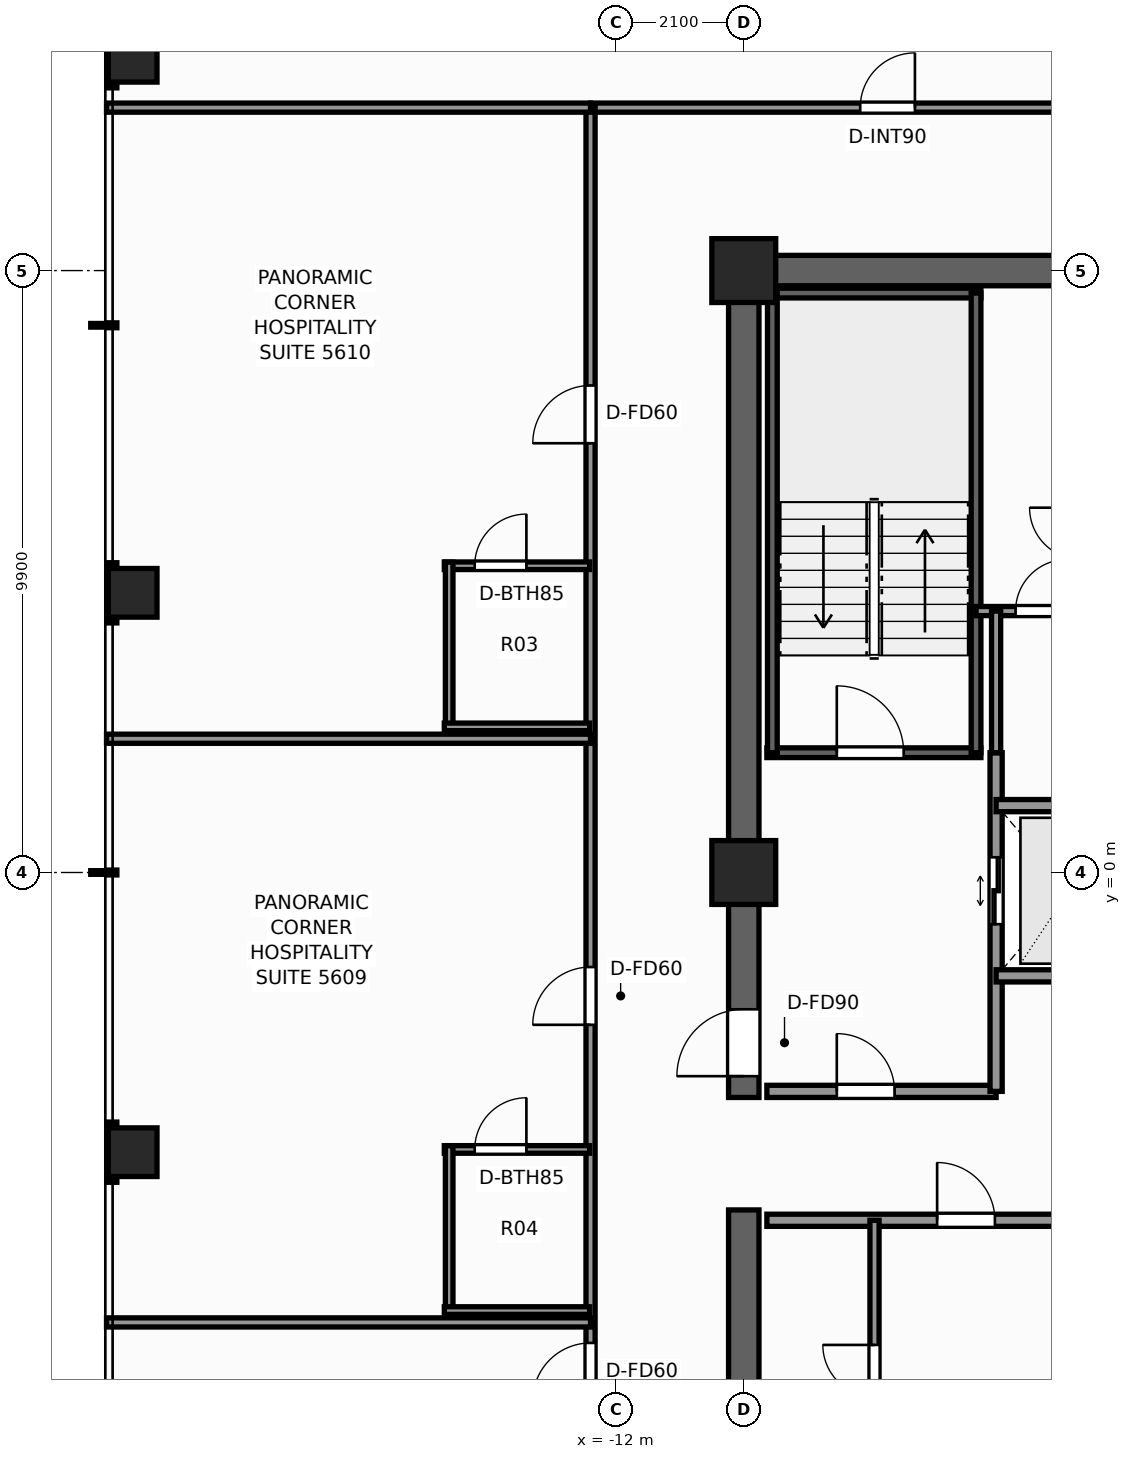
"""IFC4 building model, lengths in metres.
Left out: names, types, materials, properties, quantities, classifications, styles, units other than length and angle.
Written with IfcOpenShell. Run it as: python <this file> out.ifc"""

import sys

from ifc_helpers import new_model, si_unit, direction, frame, frame_2d, origin, origin_2d, place, context, subcontext, project, spatial, rectangle, extrude, element, fill, save


model = new_model("IFC4")
c1 = context("Model", 3, precision=1e-05, world=origin(), true_north=direction((0.0, 1.0)))
c2 = subcontext(c1, "Body", "Model", "MODEL_VIEW")
j1 = project(units=[si_unit("LENGTHUNIT", "METRE"), si_unit("PLANEANGLEUNIT", "RADIAN")], contexts=[c1])
p1 = place(None, origin())
s1 = spatial("IfcSite", under=j1, at=p1, CompositionType="ELEMENT")
p2 = place(p1, origin())
s2 = spatial("IfcBuilding", under=s1, at=p2, CompositionType="ELEMENT")
p3 = place(p2, frame((0.0, 0.0, 193.2)))
s3 = spatial("IfcBuildingStorey", under=s2, at=p3, CompositionType="ELEMENT", Elevation=193.2)
p4 = place(p3, frame((-10.15, 9.9, 0.0), z_axis=(0.0, 0.0, 1.0), x_axis=(1.0, 0.0, 0.0)))
e1 = element("IfcWall", 1, at=p4, inside=s3, PredefinedType="SHEAR", context=c2, shape_type="SweptSolid", body=[
    extrude(rectangle(XDim=14.57, YDim=0.5, at=frame_2d((7.285, 0.0))), origin(), (0.0, 0.0, 1.0), 3.3),
])
p5 = place(p3, frame((-9.9, -9.65, 0.0), z_axis=(0.0, 0.0, 1.0), x_axis=(0.0, 1.0, 0.0)))
e2 = element("IfcWall", 2, at=p5, inside=s3, PredefinedType="SHEAR", context=c2, shape_type="SweptSolid", body=[
    extrude(rectangle(XDim=4.1, YDim=0.5, at=frame_2d((2.05, 0.0))), origin(), (0.0, 0.0, 1.0), 3.3),
])
p6 = place(p3, frame((-9.9, -3.7, 0.0), z_axis=(0.0, 0.0, 1.0), x_axis=(0.0, 1.0, 0.0)))
e3 = element("IfcWall", 3, at=p6, inside=s3, PredefinedType="SHEAR", context=c2, shape_type="SweptSolid", body=[
    extrude(rectangle(XDim=13.35, YDim=0.5, at=frame_2d((6.675, 0.0))), origin(), (0.0, 0.0, 1.0), 3.3),
])
p7 = place(p6, frame((0.35, 0.0, 0.0)))
e4 = element("IfcOpeningElement", 4, at=p7, cuts=e3, PredefinedType="OPENING", context=c2, shape_type="SweptSolid", body=[
    extrude(rectangle(XDim=1.1, YDim=2.2, at=frame_2d((0.55, 1.1))), frame((0.0, 0.26, 0.0), z_axis=(0.0, -1.0, 0.0), x_axis=(1.0, 0.0, 0.0)), (0.0, 0.0, 1.0), 0.52),
])
for number, where, z_axis, x_axis in (
    (5, (-9.9, 9.9, 0.0), (0.0, 0.0, 1.0), (1.0, 0.0, 0.0)),
    (6, (-9.9, 0.0, 0.0), (0.0, 0.0, 1.0), (1.0, 0.0, 0.0)),
):
    element("IfcColumn", number, at=place(p3, frame(where, z_axis=z_axis, x_axis=x_axis)), inside=s3, PredefinedType="COLUMN", context=c2, shape_type="SweptSolid", body=[
        extrude(rectangle(XDim=1.05, YDim=1.05, at=origin_2d()), origin(), (0.0, 0.0, 1.0), 3.3),
    ])
for number, where, z_axis, x_axis in (
    (7, (-19.95, -4.6, 0.0), (0.0, 0.0, 1.0), (1.0, 0.0, 0.0)),
    (8, (-19.95, 4.6, 0.0), (0.0, 0.0, 1.0), (1.0, 0.0, 0.0)),
    (9, (-19.95, 13.4, 0.0), (0.0, 0.0, 1.0), (1.0, 0.0, 0.0)),
):
    element("IfcColumn", number, at=place(p3, frame(where, z_axis=z_axis, x_axis=x_axis)), inside=s3, PredefinedType="COLUMN", context=c2, shape_type="SweptSolid", body=[
        extrude(rectangle(XDim=0.8, YDim=0.8, at=origin_2d()), origin(), (0.0, 0.0, 1.0), 3.3),
    ])
p8 = place(p3, frame((-9.52, 1.97, 0.0), z_axis=(0.0, 0.0, 1.0), x_axis=(1.0, 0.0, 0.0)))
e10 = element("IfcWall", 10, at=p8, inside=s3, PredefinedType="SHEAR", context=c2, shape_type="SweptSolid", body=[
    extrude(rectangle(XDim=3.52, YDim=0.16, at=frame_2d((1.76, 0.0))), origin(), (0.0, 0.0, 1.0), 3.3),
])
p9 = place(p8, frame((1.15, 0.0, 0.0)))
e11 = element("IfcOpeningElement", 11, at=p9, cuts=e10, PredefinedType="OPENING", context=c2, shape_type="SweptSolid", body=[
    extrude(rectangle(XDim=1.1, YDim=2.2, at=frame_2d((0.55, 1.1))), frame((0.0, 0.09, 0.0), z_axis=(0.0, -1.0, 0.0), x_axis=(1.0, 0.0, 0.0)), (0.0, 0.0, 1.0), 0.18),
])
p10 = place(p3, frame((-9.52, 9.53, 0.0), z_axis=(0.0, 0.0, 1.0), x_axis=(1.0, 0.0, 0.0)))
e12 = element("IfcWall", 12, at=p10, inside=s3, PredefinedType="SHEAR", context=c2, shape_type="SweptSolid", body=[
    extrude(rectangle(XDim=3.52, YDim=0.16, at=frame_2d((1.76, 0.0))), origin(), (0.0, 0.0, 1.0), 3.3),
])
for number, where, z_axis, x_axis in (
    (13, (-9.43, 1.97, 0.0), (0.0, 0.0, 1.0), (0.0, 1.0, 0.0)),
    (14, (-6.08, 1.97, 0.0), (0.0, 0.0, 1.0), (0.0, 1.0, 0.0)),
):
    element("IfcWall", number, at=place(p3, frame(where, z_axis=z_axis, x_axis=x_axis)), inside=s3, PredefinedType="SHEAR", context=c2, shape_type="SweptSolid", body=[
        extrude(rectangle(XDim=7.56, YDim=0.16, at=frame_2d((3.78, 0.0))), origin(), (0.0, 0.0, 1.0), 3.3),
    ])
p11 = place(p3, frame((-9.52, -3.6, 0.0), z_axis=(0.0, 0.0, 1.0), x_axis=(1.0, 0.0, 0.0)))
e15 = element("IfcWall", 15, at=p11, inside=s3, PredefinedType="SOLIDWALL", context=c2, shape_type="SweptSolid", body=[
    extrude(rectangle(XDim=3.77, YDim=0.2, at=frame_2d((1.885, 0.0))), origin(), (0.0, 0.0, 1.0), 3.08),
])
p12 = place(p11, frame((1.15, 0.0, 0.0)))
e16 = element("IfcOpeningElement", 16, at=p12, cuts=e15, PredefinedType="OPENING", context=c2, shape_type="SweptSolid", body=[
    extrude(rectangle(XDim=0.95, YDim=2.06, at=frame_2d((0.475, 1.03))), frame((0.0, 0.11, 0.0), z_axis=(0.0, -1.0, 0.0), x_axis=(1.0, 0.0, 0.0)), (0.0, 0.0, 1.0), 0.22),
])
p13 = place(p3, frame((-5.75, -3.6, 0.0), z_axis=(0.0, 0.0, 1.0), x_axis=(0.0, 1.0, 0.0)))
e17 = element("IfcWall", 17, at=p13, inside=s3, PredefinedType="SOLIDWALL", context=c2, shape_type="SweptSolid", body=[
    extrude(rectangle(XDim=5.57, YDim=0.2, at=frame_2d((2.785, 0.0))), origin(), (0.0, 0.0, 1.0), 3.08),
])
p14 = place(p13, frame((2.75, 0.0, 0.0)))
e18 = element("IfcOpeningElement", 18, at=p14, cuts=e17, PredefinedType="OPENING", context=c2, shape_type="SweptSolid", body=[
    extrude(rectangle(XDim=1.1, YDim=2.2, at=frame_2d((0.55, 1.1))), frame((0.0, 0.11, 0.0), z_axis=(0.0, -1.0, 0.0), x_axis=(1.0, 0.0, 0.0)), (0.0, 0.0, 1.0), 0.22),
])
for number, where, z_axis, x_axis in (
    (19, (-5.75, -1.7, 0.0), (0.0, 0.0, 1.0), (1.0, 0.0, 0.0)),
    (20, (-5.75, 1.1, 0.0), (0.0, 0.0, 1.0), (1.0, 0.0, 0.0)),
):
    element("IfcWall", number, at=place(p3, frame(where, z_axis=z_axis, x_axis=x_axis)), inside=s3, PredefinedType="SOLIDWALL", context=c2, shape_type="SweptSolid", body=[
        extrude(rectangle(XDim=2.4, YDim=0.2, at=frame_2d((1.2, 0.0))), origin(), (0.0, 0.0, 1.0), 3.08),
    ])
p15 = place(p3, frame((-6.08, 4.3, 0.0), z_axis=(0.0, 0.0, 1.0), x_axis=(1.0, 0.0, 0.0)))
e21 = element("IfcWall", 21, at=p15, inside=s3, PredefinedType="PARTITIONING", context=c2, shape_type="SweptSolid", body=[
    extrude(rectangle(XDim=6.3, YDim=0.15, at=frame_2d((3.15, 0.0))), origin(), (0.0, 0.0, 1.0), 3.08),
])
p16 = place(p15, frame((0.65, 0.0, 0.0)))
e22 = element("IfcOpeningElement", 22, at=p16, cuts=e21, PredefinedType="OPENING", context=c2, shape_type="SweptSolid", body=[
    extrude(rectangle(XDim=0.85, YDim=2.03, at=frame_2d((0.425, 1.015))), frame((0.0, 0.085, 0.0), z_axis=(0.0, -1.0, 0.0), x_axis=(1.0, 0.0, 0.0)), (0.0, 0.0, 1.0), 0.17),
])
p17 = place(p3, frame((-9.52, -5.72, 0.0), z_axis=(0.0, 0.0, 1.0), x_axis=(1.0, 0.0, 0.0)))
e23 = element("IfcWall", 23, at=p17, inside=s3, PredefinedType="SOLIDWALL", context=c2, shape_type="SweptSolid", body=[
    extrude(rectangle(XDim=5.66, YDim=0.2, at=frame_2d((2.83, 0.0))), origin(), (0.0, 0.0, 1.0), 3.08),
])
p18 = place(p17, frame((2.8, 0.0, 0.0)))
e24 = element("IfcOpeningElement", 24, at=p18, cuts=e23, PredefinedType="OPENING", context=c2, shape_type="SweptSolid", body=[
    extrude(rectangle(XDim=0.95, YDim=2.06, at=frame_2d((0.475, 1.03))), frame((0.0, 0.11, 0.0), z_axis=(0.0, -1.0, 0.0), x_axis=(1.0, 0.0, 0.0)), (0.0, 0.0, 1.0), 0.22),
])
p19 = place(p3, frame((-7.75, -9.52, 0.0), z_axis=(0.0, 0.0, 1.0), x_axis=(0.0, 1.0, 0.0)))
e25 = element("IfcWall", 25, at=p19, inside=s3, PredefinedType="PARTITIONING", context=c2, shape_type="SweptSolid", body=[
    extrude(rectangle(XDim=3.8, YDim=0.15, at=frame_2d((1.9, 0.0))), origin(), (0.0, 0.0, 1.0), 3.08),
])
p20 = place(p19, frame((0.9, 0.0, 0.0)))
e26 = element("IfcOpeningElement", 26, at=p20, cuts=e25, PredefinedType="OPENING", context=c2, shape_type="SweptSolid", body=[
    extrude(rectangle(XDim=0.85, YDim=2.03, at=frame_2d((0.425, 1.015))), frame((0.0, 0.085, 0.0), z_axis=(0.0, -1.0, 0.0), x_axis=(1.0, 0.0, 0.0)), (0.0, 0.0, 1.0), 0.17),
])
p21 = place(p3, frame((-5.75, 1.97, 0.0), z_axis=(0.0, 0.0, 1.0), x_axis=(0.0, 1.0, 0.0)))
e27 = element("IfcWall", 27, at=p21, inside=s3, PredefinedType="PARTITIONING", context=c2, shape_type="SweptSolid", body=[
    extrude(rectangle(XDim=2.33, YDim=0.15, at=frame_2d((1.165, 0.0))), origin(), (0.0, 0.0, 1.0), 3.08),
])
p22 = place(p3, frame((-12.42, 12.58, 0.0), z_axis=(0.0, 0.0, 1.0), x_axis=(1.0, 0.0, 0.0)))
e28 = element("IfcWall", 28, at=p22, inside=s3, PredefinedType="PARTITIONING", context=c2, shape_type="SweptSolid", body=[
    extrude(rectangle(XDim=24.84, YDim=0.15, at=frame_2d((12.42, 0.0))), origin(), (0.0, 0.0, 1.0), 2.369),
])
p23 = place(p22, frame((4.435, 0.0, 0.0)))
e29 = element("IfcOpeningElement", 29, at=p23, cuts=e28, PredefinedType="OPENING", context=c2, shape_type="SweptSolid", body=[
    extrude(rectangle(XDim=0.9, YDim=2.06, at=frame_2d((0.45, 1.03))), frame((0.0, 0.085, 0.0), z_axis=(0.0, -1.0, 0.0), x_axis=(1.0, 0.0, 0.0)), (0.0, 0.0, 1.0), 0.17),
])
p24 = place(p22, frame((19.505, 0.0, 0.0)))
e30 = element("IfcOpeningElement", 30, at=p24, cuts=e28, PredefinedType="OPENING", context=c2, shape_type="SweptSolid", body=[
    extrude(rectangle(XDim=0.9, YDim=2.06, at=frame_2d((0.45, 1.03))), frame((0.0, 0.085, 0.0), z_axis=(0.0, -1.0, 0.0), x_axis=(1.0, 0.0, 0.0)), (0.0, 0.0, 1.0), 0.17),
])
p25 = place(p3, frame((-12.42, -12.26, 0.0), z_axis=(0.0, 0.0, 1.0), x_axis=(0.0, 1.0, 0.0)))
e31 = element("IfcWall", 31, at=p25, inside=s3, PredefinedType="PARTITIONING", context=c2, shape_type="SweptSolid", body=[
    extrude(rectangle(XDim=24.84, YDim=0.15, at=frame_2d((12.42, 0.0))), origin(), (0.0, 0.0, 1.0), 2.369),
])
p26 = place(p25, frame((3.573, 0.0, 0.0)))
e32 = element("IfcOpeningElement", 32, at=p26, cuts=e31, PredefinedType="OPENING", context=c2, shape_type="SweptSolid", body=[
    extrude(rectangle(XDim=0.95, YDim=2.06, at=frame_2d((0.475, 1.03))), frame((0.0, 0.085, 0.0), z_axis=(0.0, -1.0, 0.0), x_axis=(1.0, 0.0, 0.0)), (0.0, 0.0, 1.0), 0.17),
])
p27 = place(p25, frame((9.755, 0.0, 0.0)))
e33 = element("IfcOpeningElement", 33, at=p27, cuts=e31, PredefinedType="OPENING", context=c2, shape_type="SweptSolid", body=[
    extrude(rectangle(XDim=0.95, YDim=2.06, at=frame_2d((0.475, 1.03))), frame((0.0, 0.085, 0.0), z_axis=(0.0, -1.0, 0.0), x_axis=(1.0, 0.0, 0.0)), (0.0, 0.0, 1.0), 0.17),
])
p28 = place(p25, frame((19.32, 0.0, 0.0)))
e34 = element("IfcOpeningElement", 34, at=p28, cuts=e31, PredefinedType="OPENING", context=c2, shape_type="SweptSolid", body=[
    extrude(rectangle(XDim=0.95, YDim=2.06, at=frame_2d((0.475, 1.03))), frame((0.0, 0.085, 0.0), z_axis=(0.0, -1.0, 0.0), x_axis=(1.0, 0.0, 0.0)), (0.0, 0.0, 1.0), 0.17),
])
p29 = place(p3, frame((-20.38, 12.58, 0.0), z_axis=(0.0, 0.0, 1.0), x_axis=(1.0, 0.0, 0.0)))
e35 = element("IfcWall", 35, at=p29, inside=s3, PredefinedType="PARTITIONING", context=c2, shape_type="SweptSolid", body=[
    extrude(rectangle(XDim=7.96, YDim=0.15, at=frame_2d((3.98, 0.0))), origin(), (0.0, 0.0, 1.0), 2.369),
])
for number, where, z_axis, x_axis in (
    (36, (-20.38, -7.4, 0.0), (0.0, 0.0, 1.0), (1.0, 0.0, 0.0)),
    (37, (-20.38, 2.2, 0.0), (0.0, 0.0, 1.0), (1.0, 0.0, 0.0)),
):
    element("IfcWall", number, at=place(p3, frame(where, z_axis=z_axis, x_axis=x_axis)), inside=s3, PredefinedType="PARTITIONING", context=c2, shape_type="SweptSolid", body=[
        extrude(rectangle(XDim=7.96, YDim=0.15, at=frame_2d((3.98, 0.0))), origin(), (0.0, 0.0, 1.0), 2.453),
    ])
p30 = place(p3, frame((-14.825, -4.555, 0.0), z_axis=(0.0, 0.0, 1.0), x_axis=(1.0, 0.0, 0.0)))
e38 = element("IfcWall", 38, at=p30, inside=s3, PredefinedType="PARTITIONING", context=c2, shape_type="SweptSolid", body=[
    extrude(rectangle(XDim=2.39, YDim=0.125, at=frame_2d((1.195, 0.0))), origin(), (0.0, 0.0, 1.0), 2.369),
])
p31 = place(p30, frame((0.5, 0.0, 0.0)))
e39 = element("IfcOpeningElement", 39, at=p31, cuts=e38, PredefinedType="OPENING", context=c2, shape_type="SweptSolid", body=[
    extrude(rectangle(XDim=0.85, YDim=2.03, at=frame_2d((0.425, 1.015))), frame((0.0, 0.073, 0.0), z_axis=(0.0, -1.0, 0.0), x_axis=(1.0, 0.0, 0.0)), (0.0, 0.0, 1.0), 0.145),
])
p32 = place(p3, frame((-14.745, -7.265, 0.0), z_axis=(0.0, 0.0, 1.0), x_axis=(0.0, 1.0, 0.0)))
e40 = element("IfcWall", 40, at=p32, inside=s3, PredefinedType="PARTITIONING", context=c2, shape_type="SweptSolid", body=[
    extrude(rectangle(XDim=2.77, YDim=0.125, at=frame_2d((1.385, 0.0))), origin(), (0.0, 0.0, 1.0), 2.369),
])
p33 = place(p3, frame((-14.825, -7.205, 0.0), z_axis=(0.0, 0.0, 1.0), x_axis=(1.0, 0.0, 0.0)))
e41 = element("IfcWall", 41, at=p33, inside=s3, PredefinedType="PARTITIONING", context=c2, shape_type="SweptSolid", body=[
    extrude(rectangle(XDim=2.39, YDim=0.125, at=frame_2d((1.195, 0.0))), origin(), (0.0, 0.0, 1.0), 3.08),
])
p34 = place(p3, frame((-14.825, 5.045, 0.0), z_axis=(0.0, 0.0, 1.0), x_axis=(1.0, 0.0, 0.0)))
e42 = element("IfcWall", 42, at=p34, inside=s3, PredefinedType="PARTITIONING", context=c2, shape_type="SweptSolid", body=[
    extrude(rectangle(XDim=2.39, YDim=0.125, at=frame_2d((1.195, 0.0))), origin(), (0.0, 0.0, 1.0), 3.08),
])
p35 = place(p34, frame((0.5, 0.0, 0.0)))
e43 = element("IfcOpeningElement", 43, at=p35, cuts=e42, PredefinedType="OPENING", context=c2, shape_type="SweptSolid", body=[
    extrude(rectangle(XDim=0.85, YDim=2.03, at=frame_2d((0.425, 1.015))), frame((0.0, 0.073, 0.0), z_axis=(0.0, -1.0, 0.0), x_axis=(1.0, 0.0, 0.0)), (0.0, 0.0, 1.0), 0.145),
])
p36 = place(p3, frame((-14.745, 2.335, 0.0), z_axis=(0.0, 0.0, 1.0), x_axis=(0.0, 1.0, 0.0)))
e44 = element("IfcWall", 44, at=p36, inside=s3, PredefinedType="PARTITIONING", context=c2, shape_type="SweptSolid", body=[
    extrude(rectangle(XDim=2.77, YDim=0.125, at=frame_2d((1.385, 0.0))), origin(), (0.0, 0.0, 1.0), 2.369),
])
p37 = place(p3, frame((-14.825, 2.395, 0.0), z_axis=(0.0, 0.0, 1.0), x_axis=(1.0, 0.0, 0.0)))
e45 = element("IfcWall", 45, at=p37, inside=s3, PredefinedType="PARTITIONING", context=c2, shape_type="SweptSolid", body=[
    extrude(rectangle(XDim=2.39, YDim=0.125, at=frame_2d((1.195, 0.0))), origin(), (0.0, 0.0, 1.0), 3.08),
])
p38 = place(p9, origin())
e46 = element("IfcDoor", 46, at=p38, inside=s3, OperationType="SINGLE_SWING_LEFT", PredefinedType="DOOR", context=c2, shape_type="SweptSolid", body=[
    extrude(rectangle(XDim=1.1, YDim=2.2, at=frame_2d((0.55, 1.1))), frame((0.0, 0.025, 0.0), z_axis=(0.0, -1.0, 0.0), x_axis=(1.0, 0.0, 0.0)), (0.0, 0.0, 1.0), 0.05),
])
fill(e11, e46)
p39 = place(p7, origin())
e47 = element("IfcDoor", 47, at=p39, inside=s3, OperationType="SINGLE_SWING_LEFT", PredefinedType="DOOR", context=c2, shape_type="SweptSolid", body=[
    extrude(rectangle(XDim=1.1, YDim=2.2, at=frame_2d((0.55, 1.1))), frame((0.0, 0.025, 0.0), z_axis=(0.0, -1.0, 0.0), x_axis=(1.0, 0.0, 0.0)), (0.0, 0.0, 1.0), 0.05),
])
fill(e4, e47)
p40 = place(p14, origin())
e48 = element("IfcDoor", 48, at=p40, inside=s3, OperationType="DOUBLE_DOOR_SLIDING", PredefinedType="DOOR", context=c2, shape_type="SweptSolid", body=[
    extrude(rectangle(XDim=1.1, YDim=2.2, at=frame_2d((0.55, 1.1))), frame((0.0, 0.025, 0.0), z_axis=(0.0, -1.0, 0.0), x_axis=(1.0, 0.0, 0.0)), (0.0, 0.0, 1.0), 0.05),
])
fill(e18, e48)
p41 = place(p18, origin())
e49 = element("IfcDoor", 49, at=p41, inside=s3, OperationType="SINGLE_SWING_LEFT", PredefinedType="DOOR", context=c2, shape_type="SweptSolid", body=[
    extrude(rectangle(XDim=0.95, YDim=2.06, at=frame_2d((0.475, 1.03))), frame((0.0, 0.025, 0.0), z_axis=(0.0, -1.0, 0.0), x_axis=(1.0, 0.0, 0.0)), (0.0, 0.0, 1.0), 0.05),
])
fill(e24, e49)
p42 = place(p20, origin())
e50 = element("IfcDoor", 50, at=p42, inside=s3, OperationType="SINGLE_SWING_RIGHT", PredefinedType="DOOR", context=c2, shape_type="SweptSolid", body=[
    extrude(rectangle(XDim=0.85, YDim=2.03, at=frame_2d((0.425, 1.015))), frame((0.0, 0.025, 0.0), z_axis=(0.0, -1.0, 0.0), x_axis=(1.0, 0.0, 0.0)), (0.0, 0.0, 1.0), 0.05),
])
fill(e26, e50)
p43 = place(p12, origin())
e51 = element("IfcDoor", 51, at=p43, inside=s3, OperationType="SINGLE_SWING_LEFT", PredefinedType="DOOR", context=c2, shape_type="SweptSolid", body=[
    extrude(rectangle(XDim=0.95, YDim=2.06, at=frame_2d((0.475, 1.03))), frame((0.0, 0.025, 0.0), z_axis=(0.0, -1.0, 0.0), x_axis=(1.0, 0.0, 0.0)), (0.0, 0.0, 1.0), 0.05),
])
fill(e16, e51)
p44 = place(p16, origin())
e52 = element("IfcDoor", 52, at=p44, inside=s3, OperationType="SINGLE_SWING_RIGHT", PredefinedType="DOOR", context=c2, shape_type="SweptSolid", body=[
    extrude(rectangle(XDim=0.85, YDim=2.03, at=frame_2d((0.425, 1.015))), frame((0.0, 0.025, 0.0), z_axis=(0.0, -1.0, 0.0), x_axis=(1.0, 0.0, 0.0)), (0.0, 0.0, 1.0), 0.05),
])
fill(e22, e52)
p45 = place(p26, origin())
e53 = element("IfcDoor", 53, at=p45, inside=s3, OperationType="SINGLE_SWING_LEFT", PredefinedType="DOOR", context=c2, shape_type="SweptSolid", body=[
    extrude(rectangle(XDim=0.95, YDim=2.06, at=frame_2d((0.475, 1.03))), frame((0.0, 0.025, 0.0), z_axis=(0.0, -1.0, 0.0), x_axis=(1.0, 0.0, 0.0)), (0.0, 0.0, 1.0), 0.05),
])
fill(e32, e53)
p46 = place(p31, origin())
e54 = element("IfcDoor", 54, at=p46, inside=s3, OperationType="SINGLE_SWING_RIGHT", PredefinedType="DOOR", context=c2, shape_type="SweptSolid", body=[
    extrude(rectangle(XDim=0.85, YDim=2.03, at=frame_2d((0.425, 1.015))), frame((0.0, 0.025, 0.0), z_axis=(0.0, -1.0, 0.0), x_axis=(1.0, 0.0, 0.0)), (0.0, 0.0, 1.0), 0.05),
])
fill(e39, e54)
p47 = place(p27, origin())
e55 = element("IfcDoor", 55, at=p47, inside=s3, OperationType="SINGLE_SWING_LEFT", PredefinedType="DOOR", context=c2, shape_type="SweptSolid", body=[
    extrude(rectangle(XDim=0.95, YDim=2.06, at=frame_2d((0.475, 1.03))), frame((0.0, 0.025, 0.0), z_axis=(0.0, -1.0, 0.0), x_axis=(1.0, 0.0, 0.0)), (0.0, 0.0, 1.0), 0.05),
])
fill(e33, e55)
p48 = place(p35, origin())
e56 = element("IfcDoor", 56, at=p48, inside=s3, OperationType="SINGLE_SWING_RIGHT", PredefinedType="DOOR", context=c2, shape_type="SweptSolid", body=[
    extrude(rectangle(XDim=0.85, YDim=2.03, at=frame_2d((0.425, 1.015))), frame((0.0, 0.025, 0.0), z_axis=(0.0, -1.0, 0.0), x_axis=(1.0, 0.0, 0.0)), (0.0, 0.0, 1.0), 0.05),
])
fill(e43, e56)
p49 = place(p28, origin())
e57 = element("IfcDoor", 57, at=p49, inside=s3, OperationType="SINGLE_SWING_LEFT", PredefinedType="DOOR", context=c2, shape_type="SweptSolid", body=[
    extrude(rectangle(XDim=0.95, YDim=2.06, at=frame_2d((0.475, 1.03))), frame((0.0, 0.025, 0.0), z_axis=(0.0, -1.0, 0.0), x_axis=(1.0, 0.0, 0.0)), (0.0, 0.0, 1.0), 0.05),
])
fill(e34, e57)
p50 = place(p23, origin())
e58 = element("IfcDoor", 58, at=p50, inside=s3, OperationType="SINGLE_SWING_RIGHT", PredefinedType="DOOR", context=c2, shape_type="SweptSolid", body=[
    extrude(rectangle(XDim=0.9, YDim=2.06, at=frame_2d((0.45, 1.03))), frame((0.0, 0.025, 0.0), z_axis=(0.0, -1.0, 0.0), x_axis=(1.0, 0.0, 0.0)), (0.0, 0.0, 1.0), 0.05),
])
fill(e29, e58)
save(model, sys.argv[1])
